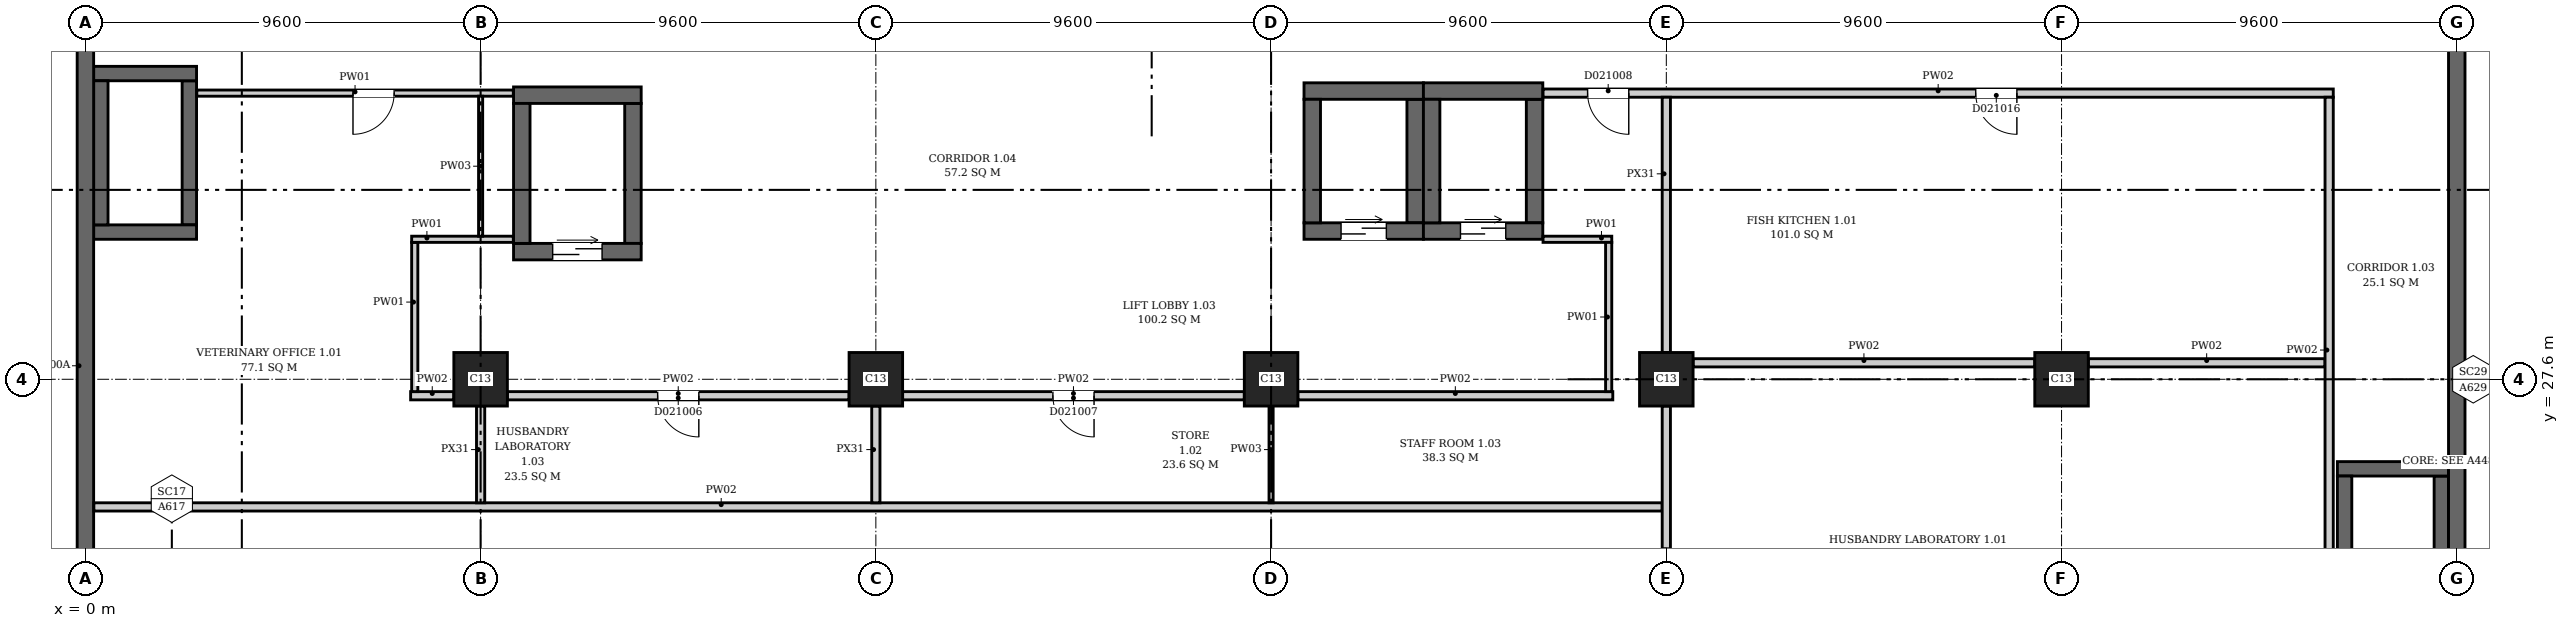
"""IFC4 building model, lengths in metres.
Left out: names, types, materials, properties, quantities, classifications, styles, units other than length and angle.
Written with IfcOpenShell. Run it as: python <this file> out.ifc"""

import sys

from ifc_helpers import new_model, si_unit, direction, frame, frame_2d, origin, origin_2d, place, context, subcontext, project, spatial, rectangle, extrude, element, fill, save


model = new_model("IFC4")
c1 = context("Model", 3, precision=1e-05, world=origin(), true_north=direction((0.0, 1.0)))
c2 = subcontext(c1, "Body", "Model", "MODEL_VIEW")
j1 = project(units=[si_unit("LENGTHUNIT", "METRE"), si_unit("PLANEANGLEUNIT", "RADIAN")], contexts=[c1])
p1 = place(None, origin())
s1 = spatial("IfcSite", under=j1, at=p1, CompositionType="ELEMENT")
p2 = place(p1, origin())
s2 = spatial("IfcBuilding", under=s1, at=p2, CompositionType="ELEMENT")
p3 = place(p2, frame((0.0, 0.0, 6.5)))
s3 = spatial("IfcBuildingStorey", under=s2, at=p3, CompositionType="ELEMENT", Elevation=6.5)
for number, where, z_axis, x_axis in (
    (1, (0.0, -0.2, 0.0), (0.0, 0.0, 1.0), (0.0, 1.0, 0.0)),
    (2, (57.6, -0.2, 0.0), (0.0, 0.0, 1.0), (0.0, 1.0, 0.0)),
):
    element("IfcWall", number, at=place(p3, frame(where, z_axis=z_axis, x_axis=x_axis)), inside=s3, PredefinedType="SHEAR", context=c2, shape_type="SweptSolid", body=[
        extrude(rectangle(XDim=46.88, YDim=0.4, at=frame_2d((23.44, 0.0))), origin(), (0.0, 0.0, 1.0), 7.7),
    ])
for number, where, z_axis, x_axis in (
    (3, (0.2, 31.175, 0.0), (0.0, 0.0, 1.0), (1.0, 0.0, 0.0)),
    (4, (0.2, 35.025, 0.0), (0.0, 0.0, 1.0), (1.0, 0.0, 0.0)),
):
    element("IfcWall", number, at=place(p3, frame(where, z_axis=z_axis, x_axis=x_axis)), inside=s3, PredefinedType="SHEAR", context=c2, shape_type="SweptSolid", body=[
        extrude(rectangle(XDim=2.5, YDim=0.35, at=frame_2d((1.25, 0.0))), origin(), (0.0, 0.0, 1.0), 7.7),
    ])
for number, where, z_axis, x_axis in (
    (5, (0.375, 31.35, 0.0), (0.0, 0.0, 1.0), (0.0, 1.0, 0.0)),
    (6, (2.525, 31.35, 0.0), (0.0, 0.0, 1.0), (0.0, 1.0, 0.0)),
):
    element("IfcWall", number, at=place(p3, frame(where, z_axis=z_axis, x_axis=x_axis)), inside=s3, PredefinedType="SHEAR", context=c2, shape_type="SweptSolid", body=[
        extrude(rectangle(XDim=3.5, YDim=0.35, at=frame_2d((1.75, 0.0))), origin(), (0.0, 0.0, 1.0), 7.7),
    ])
p4 = place(p3, frame((54.7, 25.425, 0.0), z_axis=(0.0, 0.0, 1.0), x_axis=(1.0, 0.0, 0.0)))
e7 = element("IfcWall", 7, at=p4, inside=s3, PredefinedType="SHEAR", context=c2, shape_type="SweptSolid", body=[
    extrude(rectangle(XDim=2.7, YDim=0.35, at=frame_2d((1.35, 0.0))), origin(), (0.0, 0.0, 1.0), 7.7),
])
for number, where, z_axis, x_axis in (
    (8, (54.875, 21.75, 0.0), (0.0, 0.0, 1.0), (0.0, 1.0, 0.0)),
    (9, (57.225, 21.75, 0.0), (0.0, 0.0, 1.0), (0.0, 1.0, 0.0)),
):
    element("IfcWall", number, at=place(p3, frame(where, z_axis=z_axis, x_axis=x_axis)), inside=s3, PredefinedType="SHEAR", context=c2, shape_type="SweptSolid", body=[
        extrude(rectangle(XDim=3.5, YDim=0.35, at=frame_2d((1.75, 0.0))), origin(), (0.0, 0.0, 1.0), 7.7),
    ])
p5 = place(p3, frame((10.4, 30.7, 0.0), z_axis=(0.0, 0.0, 1.0), x_axis=(1.0, 0.0, 0.0)))
e10 = element("IfcWall", 10, at=p5, inside=s3, PredefinedType="SHEAR", context=c2, shape_type="SweptSolid", body=[
    extrude(rectangle(XDim=3.1, YDim=0.4, at=frame_2d((1.55, 0.0))), origin(), (0.0, 0.0, 1.0), 7.7),
])
p6 = place(p5, frame((0.95, 0.0, 0.0)))
e11 = element("IfcOpeningElement", 11, at=p6, cuts=e10, PredefinedType="OPENING", context=c2, shape_type="SweptSolid", body=[
    extrude(rectangle(XDim=1.2, YDim=2.1, at=frame_2d((0.6, 1.05))), frame((0.0, 0.21, 0.0), z_axis=(0.0, -1.0, 0.0), x_axis=(1.0, 0.0, 0.0)), (0.0, 0.0, 1.0), 0.42),
])
p7 = place(p3, frame((10.4, 34.5, 0.0), z_axis=(0.0, 0.0, 1.0), x_axis=(1.0, 0.0, 0.0)))
e12 = element("IfcWall", 12, at=p7, inside=s3, PredefinedType="SHEAR", context=c2, shape_type="SweptSolid", body=[
    extrude(rectangle(XDim=3.1, YDim=0.4, at=frame_2d((1.55, 0.0))), origin(), (0.0, 0.0, 1.0), 7.7),
])
for number, where, z_axis, x_axis in (
    (13, (10.6, 30.9, 0.0), (0.0, 0.0, 1.0), (0.0, 1.0, 0.0)),
    (14, (13.3, 30.9, 0.0), (0.0, 0.0, 1.0), (0.0, 1.0, 0.0)),
):
    element("IfcWall", number, at=place(p3, frame(where, z_axis=z_axis, x_axis=x_axis)), inside=s3, PredefinedType="SHEAR", context=c2, shape_type="SweptSolid", body=[
        extrude(rectangle(XDim=3.4, YDim=0.4, at=frame_2d((1.7, 0.0))), origin(), (0.0, 0.0, 1.0), 7.7),
    ])
p8 = place(p3, frame((29.6, 31.2, 0.0), z_axis=(0.0, 0.0, 1.0), x_axis=(1.0, 0.0, 0.0)))
e15 = element("IfcWall", 15, at=p8, inside=s3, PredefinedType="SHEAR", context=c2, shape_type="SweptSolid", body=[
    extrude(rectangle(XDim=2.9, YDim=0.4, at=frame_2d((1.45, 0.0))), origin(), (0.0, 0.0, 1.0), 7.7),
])
p9 = place(p8, frame((0.9, 0.0, 0.0)))
e16 = element("IfcOpeningElement", 16, at=p9, cuts=e15, PredefinedType="OPENING", context=c2, shape_type="SweptSolid", body=[
    extrude(rectangle(XDim=1.1, YDim=2.1, at=frame_2d((0.55, 1.05))), frame((0.0, 0.21, 0.0), z_axis=(0.0, -1.0, 0.0), x_axis=(1.0, 0.0, 0.0)), (0.0, 0.0, 1.0), 0.42),
])
p10 = place(p3, frame((29.6, 34.6, 0.0), z_axis=(0.0, 0.0, 1.0), x_axis=(1.0, 0.0, 0.0)))
e17 = element("IfcWall", 17, at=p10, inside=s3, PredefinedType="SHEAR", context=c2, shape_type="SweptSolid", body=[
    extrude(rectangle(XDim=2.9, YDim=0.4, at=frame_2d((1.45, 0.0))), origin(), (0.0, 0.0, 1.0), 7.7),
])
for number, where, z_axis, x_axis in (
    (18, (29.8, 31.4, 0.0), (0.0, 0.0, 1.0), (0.0, 1.0, 0.0)),
    (19, (32.3, 31.4, 0.0), (0.0, 0.0, 1.0), (0.0, 1.0, 0.0)),
):
    element("IfcWall", number, at=place(p3, frame(where, z_axis=z_axis, x_axis=x_axis)), inside=s3, PredefinedType="SHEAR", context=c2, shape_type="SweptSolid", body=[
        extrude(rectangle(XDim=3.0, YDim=0.4, at=frame_2d((1.5, 0.0))), origin(), (0.0, 0.0, 1.0), 7.7),
    ])
p11 = place(p3, frame((32.5, 31.2, 0.0), z_axis=(0.0, 0.0, 1.0), x_axis=(1.0, 0.0, 0.0)))
e20 = element("IfcWall", 20, at=p11, inside=s3, PredefinedType="SHEAR", context=c2, shape_type="SweptSolid", body=[
    extrude(rectangle(XDim=2.9, YDim=0.4, at=frame_2d((1.45, 0.0))), origin(), (0.0, 0.0, 1.0), 7.7),
])
p12 = place(p11, frame((0.9, 0.0, 0.0)))
e21 = element("IfcOpeningElement", 21, at=p12, cuts=e20, PredefinedType="OPENING", context=c2, shape_type="SweptSolid", body=[
    extrude(rectangle(XDim=1.1, YDim=2.1, at=frame_2d((0.55, 1.05))), frame((0.0, 0.21, 0.0), z_axis=(0.0, -1.0, 0.0), x_axis=(1.0, 0.0, 0.0)), (0.0, 0.0, 1.0), 0.42),
])
p13 = place(p3, frame((32.5, 34.6, 0.0), z_axis=(0.0, 0.0, 1.0), x_axis=(1.0, 0.0, 0.0)))
e22 = element("IfcWall", 22, at=p13, inside=s3, PredefinedType="SHEAR", context=c2, shape_type="SweptSolid", body=[
    extrude(rectangle(XDim=2.9, YDim=0.4, at=frame_2d((1.45, 0.0))), origin(), (0.0, 0.0, 1.0), 7.7),
])
for number, where, z_axis, x_axis in (
    (23, (32.7, 31.4, 0.0), (0.0, 0.0, 1.0), (0.0, 1.0, 0.0)),
    (24, (35.2, 31.4, 0.0), (0.0, 0.0, 1.0), (0.0, 1.0, 0.0)),
):
    element("IfcWall", number, at=place(p3, frame(where, z_axis=z_axis, x_axis=x_axis)), inside=s3, PredefinedType="SHEAR", context=c2, shape_type="SweptSolid", body=[
        extrude(rectangle(XDim=3.0, YDim=0.4, at=frame_2d((1.5, 0.0))), origin(), (0.0, 0.0, 1.0), 7.7),
    ])
for number, where, z_axis, x_axis in (
    (25, (9.6, 27.6, 0.0), (0.0, 0.0, 1.0), (1.0, 0.0, 0.0)),
    (26, (19.2, 27.6, 0.0), (0.0, 0.0, 1.0), (1.0, 0.0, 0.0)),
    (27, (28.8, 27.6, 0.0), (0.0, 0.0, 1.0), (1.0, 0.0, 0.0)),
    (28, (38.4, 27.6, 0.0), (0.0, 0.0, 1.0), (1.0, 0.0, 0.0)),
    (29, (48.0, 27.6, 0.0), (0.0, 0.0, 1.0), (1.0, 0.0, 0.0)),
):
    element("IfcColumn", number, at=place(p3, frame(where, z_axis=z_axis, x_axis=x_axis)), inside=s3, PredefinedType="COLUMN", context=c2, shape_type="SweptSolid", body=[
        extrude(rectangle(XDim=1.3, YDim=1.3, at=origin_2d()), origin(), (0.0, 0.0, 1.0), 7.7),
    ])
p14 = place(p3, frame((0.206, 24.5, 0.0), z_axis=(0.0, 0.0, 1.0), x_axis=(1.0, 0.0, 0.0)))
e30 = element("IfcWall", 30, at=p14, inside=s3, PredefinedType="PARTITIONING", context=c2, shape_type="SweptSolid", body=[
    extrude(rectangle(XDim=38.094, YDim=0.2, at=frame_2d((19.047, 0.0))), origin(), (0.0, 0.0, 1.0), 7.35),
])
p15 = place(p3, frame((2.706, 34.55, 0.0), z_axis=(0.0, 0.0, 1.0), x_axis=(1.0, 0.0, 0.0)))
e31 = element("IfcWall", 31, at=p15, inside=s3, PredefinedType="PARTITIONING", context=c2, shape_type="SweptSolid", body=[
    extrude(rectangle(XDim=7.688, YDim=0.15, at=frame_2d((3.844, 0.0))), origin(), (0.0, 0.0, 1.0), 7.35),
])
p16 = place(p15, frame((3.794, 0.0, 0.0)))
e32 = element("IfcOpeningElement", 32, at=p16, cuts=e31, PredefinedType="OPENING", context=c2, shape_type="SweptSolid", body=[
    extrude(rectangle(XDim=1.0, YDim=2.1, at=frame_2d((0.5, 1.05))), frame((0.0, 0.085, 0.0), z_axis=(0.0, -1.0, 0.0), x_axis=(1.0, 0.0, 0.0)), (0.0, 0.0, 1.0), 0.17),
])
p17 = place(p3, frame((7.9, 27.2, 0.0), z_axis=(0.0, 0.0, 1.0), x_axis=(1.0, 0.0, 0.0)))
e33 = element("IfcWall", 33, at=p17, inside=s3, PredefinedType="PARTITIONING", context=c2, shape_type="SweptSolid", body=[
    extrude(rectangle(XDim=1.05, YDim=0.2, at=frame_2d((0.525, 0.0))), origin(), (0.0, 0.0, 1.0), 7.35),
])
p18 = place(p3, frame((8.0, 27.3, 0.0), z_axis=(0.0, 0.0, 1.0), x_axis=(0.0, 1.0, 0.0)))
e34 = element("IfcWall", 34, at=p18, inside=s3, PredefinedType="PARTITIONING", context=c2, shape_type="SweptSolid", body=[
    extrude(rectangle(XDim=3.625, YDim=0.15, at=frame_2d((1.812, 0.0))), origin(), (0.0, 0.0, 1.0), 7.35),
])
p19 = place(p3, frame((7.925, 31.0, 0.0), z_axis=(0.0, 0.0, 1.0), x_axis=(1.0, 0.0, 0.0)))
e35 = element("IfcWall", 35, at=p19, inside=s3, PredefinedType="PARTITIONING", context=c2, shape_type="SweptSolid", body=[
    extrude(rectangle(XDim=2.469, YDim=0.15, at=frame_2d((1.234, 0.0))), origin(), (0.0, 0.0, 1.0), 7.35),
])
p20 = place(p3, frame((9.6, 24.6, 0.0), z_axis=(0.0, 0.0, 1.0), x_axis=(0.0, 1.0, 0.0)))
e36 = element("IfcWall", 36, at=p20, inside=s3, PredefinedType="PARTITIONING", context=c2, shape_type="SweptSolid", body=[
    extrude(rectangle(XDim=2.35, YDim=0.2, at=frame_2d((1.175, 0.0))), origin(), (0.0, 0.0, 1.0), 6.95),
])
p21 = place(p3, frame((9.6, 31.075, 0.0), z_axis=(0.0, 0.0, 1.0), x_axis=(0.0, 1.0, 0.0)))
e37 = element("IfcWall", 37, at=p21, inside=s3, PredefinedType="PARTITIONING", context=c2, shape_type="SweptSolid", body=[
    extrude(rectangle(XDim=3.4, YDim=0.1, at=frame_2d((1.7, 0.0))), origin(), (0.0, 0.0, 1.0), 6.95),
])
p22 = place(p3, frame((10.25, 27.2, 0.0), z_axis=(0.0, 0.0, 1.0), x_axis=(1.0, 0.0, 0.0)))
e38 = element("IfcWall", 38, at=p22, inside=s3, PredefinedType="PARTITIONING", context=c2, shape_type="SweptSolid", body=[
    extrude(rectangle(XDim=8.3, YDim=0.2, at=frame_2d((4.15, 0.0))), origin(), (0.0, 0.0, 1.0), 7.35),
])
p23 = place(p22, frame((3.65, 0.0, 0.0)))
e39 = element("IfcOpeningElement", 39, at=p23, cuts=e38, PredefinedType="OPENING", context=c2, shape_type="SweptSolid", body=[
    extrude(rectangle(XDim=1.0, YDim=2.1, at=frame_2d((0.5, 1.05))), frame((0.0, 0.11, 0.0), z_axis=(0.0, -1.0, 0.0), x_axis=(1.0, 0.0, 0.0)), (0.0, 0.0, 1.0), 0.22),
])
p24 = place(p3, frame((19.2, 24.6, 0.0), z_axis=(0.0, 0.0, 1.0), x_axis=(0.0, 1.0, 0.0)))
e40 = element("IfcWall", 40, at=p24, inside=s3, PredefinedType="PARTITIONING", context=c2, shape_type="SweptSolid", body=[
    extrude(rectangle(XDim=2.35, YDim=0.2, at=frame_2d((1.175, 0.0))), origin(), (0.0, 0.0, 1.0), 6.95),
])
p25 = place(p3, frame((19.85, 27.2, 0.0), z_axis=(0.0, 0.0, 1.0), x_axis=(1.0, 0.0, 0.0)))
e41 = element("IfcWall", 41, at=p25, inside=s3, PredefinedType="PARTITIONING", context=c2, shape_type="SweptSolid", body=[
    extrude(rectangle(XDim=8.3, YDim=0.2, at=frame_2d((4.15, 0.0))), origin(), (0.0, 0.0, 1.0), 7.35),
])
p26 = place(p25, frame((3.65, 0.0, 0.0)))
e42 = element("IfcOpeningElement", 42, at=p26, cuts=e41, PredefinedType="OPENING", context=c2, shape_type="SweptSolid", body=[
    extrude(rectangle(XDim=1.0, YDim=2.1, at=frame_2d((0.5, 1.05))), frame((0.0, 0.11, 0.0), z_axis=(0.0, -1.0, 0.0), x_axis=(1.0, 0.0, 0.0)), (0.0, 0.0, 1.0), 0.22),
])
p27 = place(p3, frame((28.8, 24.6, 0.0), z_axis=(0.0, 0.0, 1.0), x_axis=(0.0, 1.0, 0.0)))
e43 = element("IfcWall", 43, at=p27, inside=s3, PredefinedType="PARTITIONING", context=c2, shape_type="SweptSolid", body=[
    extrude(rectangle(XDim=2.35, YDim=0.1, at=frame_2d((1.175, 0.0))), origin(), (0.0, 0.0, 1.0), 6.95),
])
p28 = place(p3, frame((29.45, 27.2, 0.0), z_axis=(0.0, 0.0, 1.0), x_axis=(1.0, 0.0, 0.0)))
e44 = element("IfcWall", 44, at=p28, inside=s3, PredefinedType="PARTITIONING", context=c2, shape_type="SweptSolid", body=[
    extrude(rectangle(XDim=7.65, YDim=0.2, at=frame_2d((3.825, 0.0))), origin(), (0.0, 0.0, 1.0), 7.35),
])
p29 = place(p3, frame((35.406, 31.0, 0.0), z_axis=(0.0, 0.0, 1.0), x_axis=(1.0, 0.0, 0.0)))
e45 = element("IfcWall", 45, at=p29, inside=s3, PredefinedType="PARTITIONING", context=c2, shape_type="SweptSolid", body=[
    extrude(rectangle(XDim=1.669, YDim=0.15, at=frame_2d((0.834, 0.0))), origin(), (0.0, 0.0, 1.0), 7.35),
])
p30 = place(p3, frame((35.406, 34.55, 0.0), z_axis=(0.0, 0.0, 1.0), x_axis=(1.0, 0.0, 0.0)))
e46 = element("IfcWall", 46, at=p30, inside=s3, PredefinedType="PARTITIONING", context=c2, shape_type="SweptSolid", body=[
    extrude(rectangle(XDim=19.194, YDim=0.2, at=frame_2d((9.597, 0.0))), origin(), (0.0, 0.0, 1.0), 7.35),
])
p31 = place(p30, frame((1.082, 0.0, 0.0)))
e47 = element("IfcOpeningElement", 47, at=p31, cuts=e46, PredefinedType="OPENING", context=c2, shape_type="SweptSolid", body=[
    extrude(rectangle(XDim=1.0, YDim=2.1, at=frame_2d((0.5, 1.05))), frame((0.0, 0.11, 0.0), z_axis=(0.0, -1.0, 0.0), x_axis=(1.0, 0.0, 0.0)), (0.0, 0.0, 1.0), 0.22),
])
p32 = place(p30, frame((10.509, 0.0, 0.0)))
e48 = element("IfcOpeningElement", 48, at=p32, cuts=e46, PredefinedType="OPENING", context=c2, shape_type="SweptSolid", body=[
    extrude(rectangle(XDim=1.0, YDim=2.1, at=frame_2d((0.5, 1.05))), frame((0.0, 0.11, 0.0), z_axis=(0.0, -1.0, 0.0), x_axis=(1.0, 0.0, 0.0)), (0.0, 0.0, 1.0), 0.22),
])
p33 = place(p3, frame((37.0, 27.3, 0.0), z_axis=(0.0, 0.0, 1.0), x_axis=(0.0, 1.0, 0.0)))
e49 = element("IfcWall", 49, at=p33, inside=s3, PredefinedType="PARTITIONING", context=c2, shape_type="SweptSolid", body=[
    extrude(rectangle(XDim=3.625, YDim=0.15, at=frame_2d((1.812, 0.0))), origin(), (0.0, 0.0, 1.0), 7.35),
])
p34 = place(p3, frame((38.4, 19.05, 0.0), z_axis=(0.0, 0.0, 1.0), x_axis=(0.0, 1.0, 0.0)))
e50 = element("IfcWall", 50, at=p34, inside=s3, PredefinedType="PARTITIONING", context=c2, shape_type="SweptSolid", body=[
    extrude(rectangle(XDim=7.9, YDim=0.2, at=frame_2d((3.95, 0.0))), origin(), (0.0, 0.0, 1.0), 6.95),
])
p35 = place(p34, frame((3.45, 0.0, 0.0)))
e51 = element("IfcOpeningElement", 51, at=p35, cuts=e50, PredefinedType="OPENING", context=c2, shape_type="SweptSolid", body=[
    extrude(rectangle(XDim=1.0, YDim=2.1, at=frame_2d((0.5, 1.05))), frame((0.0, 0.11, 0.0), z_axis=(0.0, -1.0, 0.0), x_axis=(1.0, 0.0, 0.0)), (0.0, 0.0, 1.0), 0.22),
])
p36 = place(p3, frame((38.4, 28.25, 0.0), z_axis=(0.0, 0.0, 1.0), x_axis=(0.0, 1.0, 0.0)))
e52 = element("IfcWall", 52, at=p36, inside=s3, PredefinedType="PARTITIONING", context=c2, shape_type="SweptSolid", body=[
    extrude(rectangle(XDim=6.2, YDim=0.2, at=frame_2d((3.1, 0.0))), origin(), (0.0, 0.0, 1.0), 6.95),
])
p37 = place(p3, frame((39.05, 28.0, 0.0), z_axis=(0.0, 0.0, 1.0), x_axis=(1.0, 0.0, 0.0)))
e53 = element("IfcWall", 53, at=p37, inside=s3, PredefinedType="PARTITIONING", context=c2, shape_type="SweptSolid", body=[
    extrude(rectangle(XDim=8.3, YDim=0.2, at=frame_2d((4.15, 0.0))), origin(), (0.0, 0.0, 1.0), 7.35),
])
p38 = place(p3, frame((48.65, 28.0, 0.0), z_axis=(0.0, 0.0, 1.0), x_axis=(1.0, 0.0, 0.0)))
e54 = element("IfcWall", 54, at=p38, inside=s3, PredefinedType="PARTITIONING", context=c2, shape_type="SweptSolid", body=[
    extrude(rectangle(XDim=5.75, YDim=0.2, at=frame_2d((2.875, 0.0))), origin(), (0.0, 0.0, 1.0), 7.35),
])
p39 = place(p3, frame((54.5, 19.1, 0.0), z_axis=(0.0, 0.0, 1.0), x_axis=(0.0, 1.0, 0.0)))
e55 = element("IfcWall", 55, at=p39, inside=s3, PredefinedType="PARTITIONING", context=c2, shape_type="SweptSolid", body=[
    extrude(rectangle(XDim=15.35, YDim=0.2, at=frame_2d((7.675, 0.0))), origin(), (0.0, 0.0, 1.0), 7.35),
])
p40 = place(p6, origin())
e56 = element("IfcDoor", 56, at=p40, inside=s3, OperationType="DOUBLE_DOOR_SLIDING", PredefinedType="DOOR", context=c2, shape_type="SweptSolid", body=[
    extrude(rectangle(XDim=1.2, YDim=2.1, at=frame_2d((0.6, 1.05))), frame((0.0, 0.025, 0.0), z_axis=(0.0, -1.0, 0.0), x_axis=(1.0, 0.0, 0.0)), (0.0, 0.0, 1.0), 0.05),
])
fill(e11, e56)
p41 = place(p9, origin())
e57 = element("IfcDoor", 57, at=p41, inside=s3, OperationType="DOUBLE_DOOR_SLIDING", PredefinedType="DOOR", context=c2, shape_type="SweptSolid", body=[
    extrude(rectangle(XDim=1.1, YDim=2.1, at=frame_2d((0.55, 1.05))), frame((0.0, 0.025, 0.0), z_axis=(0.0, -1.0, 0.0), x_axis=(1.0, 0.0, 0.0)), (0.0, 0.0, 1.0), 0.05),
])
fill(e16, e57)
p42 = place(p12, origin())
e58 = element("IfcDoor", 58, at=p42, inside=s3, OperationType="DOUBLE_DOOR_SLIDING", PredefinedType="DOOR", context=c2, shape_type="SweptSolid", body=[
    extrude(rectangle(XDim=1.1, YDim=2.1, at=frame_2d((0.55, 1.05))), frame((0.0, 0.025, 0.0), z_axis=(0.0, -1.0, 0.0), x_axis=(1.0, 0.0, 0.0)), (0.0, 0.0, 1.0), 0.05),
])
fill(e21, e58)
p43 = place(p16, origin())
e59 = element("IfcDoor", 59, at=p43, inside=s3, OperationType="SINGLE_SWING_LEFT", PredefinedType="DOOR", context=c2, shape_type="SweptSolid", body=[
    extrude(rectangle(XDim=1.0, YDim=2.1, at=frame_2d((0.5, 1.05))), frame((0.0, 0.025, 0.0), z_axis=(0.0, -1.0, 0.0), x_axis=(1.0, 0.0, 0.0)), (0.0, 0.0, 1.0), 0.05),
])
fill(e32, e59)
p44 = place(p23, origin())
e60 = element("IfcDoor", 60, at=p44, inside=s3, OperationType="SINGLE_SWING_RIGHT", PredefinedType="DOOR", context=c2, shape_type="SweptSolid", body=[
    extrude(rectangle(XDim=1.0, YDim=2.1, at=frame_2d((0.5, 1.05))), frame((0.0, 0.025, 0.0), z_axis=(0.0, -1.0, 0.0), x_axis=(1.0, 0.0, 0.0)), (0.0, 0.0, 1.0), 0.05),
])
fill(e39, e60)
p45 = place(p26, origin())
e61 = element("IfcDoor", 61, at=p45, inside=s3, OperationType="SINGLE_SWING_RIGHT", PredefinedType="DOOR", context=c2, shape_type="SweptSolid", body=[
    extrude(rectangle(XDim=1.0, YDim=2.1, at=frame_2d((0.5, 1.05))), frame((0.0, 0.025, 0.0), z_axis=(0.0, -1.0, 0.0), x_axis=(1.0, 0.0, 0.0)), (0.0, 0.0, 1.0), 0.05),
])
fill(e42, e61)
p46 = place(p31, origin())
e62 = element("IfcDoor", 62, at=p46, inside=s3, OperationType="SINGLE_SWING_RIGHT", PredefinedType="DOOR", context=c2, shape_type="SweptSolid", body=[
    extrude(rectangle(XDim=1.0, YDim=2.1, at=frame_2d((0.5, 1.05))), frame((0.0, 0.025, 0.0), z_axis=(0.0, -1.0, 0.0), x_axis=(1.0, 0.0, 0.0)), (0.0, 0.0, 1.0), 0.05),
])
fill(e47, e62)
p47 = place(p32, origin())
e63 = element("IfcDoor", 63, at=p47, inside=s3, OperationType="SINGLE_SWING_RIGHT", PredefinedType="DOOR", context=c2, shape_type="SweptSolid", body=[
    extrude(rectangle(XDim=1.0, YDim=2.1, at=frame_2d((0.5, 1.05))), frame((0.0, 0.025, 0.0), z_axis=(0.0, -1.0, 0.0), x_axis=(1.0, 0.0, 0.0)), (0.0, 0.0, 1.0), 0.05),
])
fill(e48, e63)
save(model, sys.argv[1])
